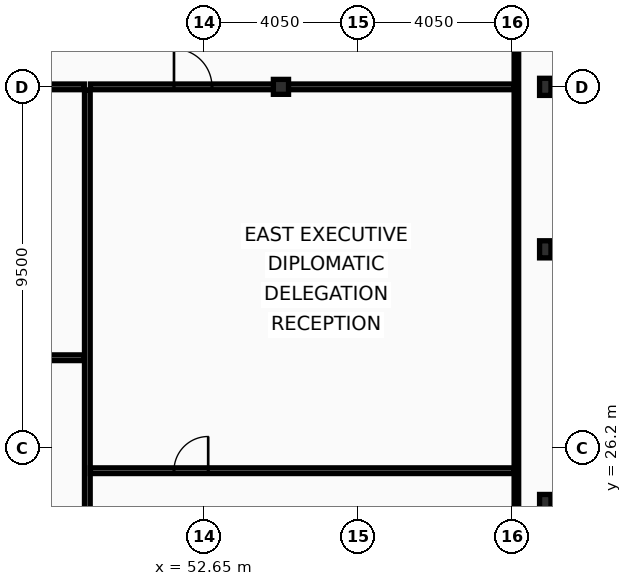
"""IFC4 building model, lengths in metres.
Left out: names, types, materials, properties, quantities, classifications, styles, units other than length and angle.
Written with IfcOpenShell. Run it as: python <this file> out.ifc"""

import sys

from ifc_helpers import new_model, si_unit, direction, frame, frame_2d, origin, origin_2d, place, context, subcontext, project, spatial, rectangle, i_section, extrude, element, fill, save


model = new_model("IFC4")
c1 = context("Model", 3, precision=1e-05, world=origin(), true_north=direction((0.0, 1.0)))
c2 = subcontext(c1, "Body", "Model", "MODEL_VIEW")
j1 = project(units=[si_unit("LENGTHUNIT", "METRE"), si_unit("PLANEANGLEUNIT", "RADIAN")], contexts=[c1])
p1 = place(None, origin())
s1 = spatial("IfcSite", under=j1, at=p1, CompositionType="ELEMENT")
p2 = place(p1, origin())
s2 = spatial("IfcBuilding", under=s1, at=p2, CompositionType="ELEMENT")
p3 = place(p2, frame((0.0, 0.0, 321.8)))
s3 = spatial("IfcBuildingStorey", under=s2, at=p3, CompositionType="ELEMENT", Elevation=321.8)
for number, where, z_axis, x_axis in (
    (1, (61.63, 24.75, 0.0), (0.0, 0.0, 1.0), (1.0, 0.0, 0.0)),
    (2, (61.63, 31.425, 0.0), (0.0, 0.0, 1.0), (1.0, 0.0, 0.0)),
    (3, (61.63, 35.7, 0.0), (0.0, 0.0, 1.0), (1.0, 0.0, 0.0)),
):
    element("IfcColumn", number, at=place(p3, frame(where, z_axis=z_axis, x_axis=x_axis)), inside=s3, PredefinedType="COLUMN", context=c2, shape_type="SweptSolid", body=[
        extrude(i_section(OverallWidth=0.3, OverallDepth=0.45, WebThickness=0.014, FlangeThickness=0.026, at=origin_2d()), origin(), (0.0, 0.0, 1.0), 3.6),
    ])
p4 = place(p3, frame((54.675, 35.7, 0.0), z_axis=(0.0, 0.0, 1.0), x_axis=(1.0, 0.0, 0.0)))
e4 = element("IfcColumn", 4, at=p4, inside=s3, PredefinedType="COLUMN", context=c2, shape_type="SweptSolid", body=[
    extrude(i_section(OverallWidth=0.399, OverallDepth=0.393, WebThickness=0.023, FlangeThickness=0.037, at=origin_2d()), origin(), (0.0, 0.0, 1.0), 3.6),
])
p5 = place(p3, frame((49.58, 10.665, 0.0), z_axis=(0.0, 0.0, 1.0), x_axis=(0.0, 1.0, 0.0)))
e5 = element("IfcWall", 5, at=p5, inside=s3, PredefinedType="PARTITIONING", context=c2, shape_type="SweptSolid", body=[
    extrude(rectangle(XDim=24.955, YDim=0.15, at=frame_2d((12.478, 0.0))), origin(), (0.0, 0.0, 1.0), 3.07),
])
p6 = place(p5, frame((3.2, 0.0, 0.0)))
e6 = element("IfcOpeningElement", 6, at=p6, cuts=e5, PredefinedType="OPENING", context=c2, shape_type="SweptSolid", body=[
    extrude(rectangle(XDim=1.1, YDim=2.1, at=frame_2d((0.55, 1.05))), frame((0.0, 0.085, 0.0), z_axis=(0.0, -1.0, 0.0), x_axis=(1.0, 0.0, 0.0)), (0.0, 0.0, 1.0), 0.17),
])
p7 = place(p3, frame((24.48, 35.7, 0.0), z_axis=(0.0, 0.0, 1.0), x_axis=(1.0, 0.0, 0.0)))
e7 = element("IfcWall", 7, at=p7, inside=s3, PredefinedType="PARTITIONING", context=c2, shape_type="SweptSolid", body=[
    extrude(rectangle(XDim=25.02, YDim=0.15, at=frame_2d((12.51, 0.0))), origin(), (0.0, 0.0, 1.0), 2.83),
])
p8 = place(p3, frame((49.66, 35.7, 0.0), z_axis=(0.0, 0.0, 1.0), x_axis=(1.0, 0.0, 0.0)))
e8 = element("IfcWall", 8, at=p8, inside=s3, PredefinedType="PARTITIONING", context=c2, shape_type="SweptSolid", body=[
    extrude(rectangle(XDim=11.145, YDim=0.15, at=frame_2d((5.573, 0.0))), origin(), (0.0, 0.0, 1.0), 2.83),
])
p9 = place(p8, frame((2.2, 0.0, 0.0)))
e9 = element("IfcOpeningElement", 9, at=p9, cuts=e8, PredefinedType="OPENING", context=c2, shape_type="SweptSolid", body=[
    extrude(rectangle(XDim=1.0, YDim=2.05, at=frame_2d((0.5, 1.025))), frame((0.0, 0.085, 0.0), z_axis=(0.0, -1.0, 0.0), x_axis=(1.0, 0.0, 0.0)), (0.0, 0.0, 1.0), 0.17),
])
p10 = place(p3, frame((49.66, 25.6, 0.0), z_axis=(0.0, 0.0, 1.0), x_axis=(1.0, 0.0, 0.0)))
e10 = element("IfcWall", 10, at=p10, inside=s3, PredefinedType="PARTITIONING", context=c2, shape_type="SweptSolid", body=[
    extrude(rectangle(XDim=11.145, YDim=0.15, at=frame_2d((5.573, 0.0))), origin(), (0.0, 0.0, 1.0), 2.83),
])
p11 = place(p10, frame((2.2, 0.0, 0.0)))
e11 = element("IfcOpeningElement", 11, at=p11, cuts=e10, PredefinedType="OPENING", context=c2, shape_type="SweptSolid", body=[
    extrude(rectangle(XDim=0.9, YDim=2.05, at=frame_2d((0.45, 1.025))), frame((0.0, 0.085, 0.0), z_axis=(0.0, -1.0, 0.0), x_axis=(1.0, 0.0, 0.0)), (0.0, 0.0, 1.0), 0.17),
])
p12 = place(p3, frame((42.448, 28.572, 0.0), z_axis=(0.0, 0.0, 1.0), x_axis=(1.0, 0.0, 0.0)))
e12 = element("IfcWall", 12, at=p12, inside=s3, PredefinedType="PARTITIONING", context=c2, shape_type="SweptSolid", body=[
    extrude(rectangle(XDim=7.052, YDim=0.15, at=frame_2d((3.526, 0.0))), origin(), (0.0, 0.0, 1.0), 2.83),
])
p13 = place(p12, frame((3.245, 0.0, 0.0)))
e13 = element("IfcOpeningElement", 13, at=p13, cuts=e12, PredefinedType="OPENING", context=c2, shape_type="SweptSolid", body=[
    extrude(rectangle(XDim=0.9, YDim=2.05, at=frame_2d((0.45, 1.025))), frame((0.0, 0.085, 0.0), z_axis=(0.0, -1.0, 0.0), x_axis=(1.0, 0.0, 0.0)), (0.0, 0.0, 1.0), 0.17),
])
p14 = place(p3, frame((60.87, 10.665, 0.0), z_axis=(0.0, 0.0, 1.0), x_axis=(0.0, 1.0, 0.0)))
e14 = element("IfcWall", 14, at=p14, inside=s3, PredefinedType="PARTITIONING", context=c2, shape_type="SweptSolid", body=[
    extrude(rectangle(XDim=42.11, YDim=0.12, at=frame_2d((21.055, 0.0))), origin(), (0.0, 0.0, 1.0), 2.83),
])
p15 = place(p9, origin())
e15 = element("IfcDoor", 15, at=p15, inside=s3, OperationType="SINGLE_SWING_LEFT", PredefinedType="DOOR", context=c2, shape_type="SweptSolid", body=[
    extrude(rectangle(XDim=1.0, YDim=2.05, at=frame_2d((0.5, 1.025))), frame((0.0, 0.025, 0.0), z_axis=(0.0, -1.0, 0.0), x_axis=(1.0, 0.0, 0.0)), (0.0, 0.0, 1.0), 0.05),
])
fill(e9, e15)
p16 = place(p11, origin())
e16 = element("IfcDoor", 16, at=p16, inside=s3, OperationType="SINGLE_SWING_RIGHT", PredefinedType="DOOR", context=c2, shape_type="SweptSolid", body=[
    extrude(rectangle(XDim=0.9, YDim=2.05, at=frame_2d((0.45, 1.025))), frame((0.0, 0.025, 0.0), z_axis=(0.0, -1.0, 0.0), x_axis=(1.0, 0.0, 0.0)), (0.0, 0.0, 1.0), 0.05),
])
fill(e11, e16)
save(model, sys.argv[1])
